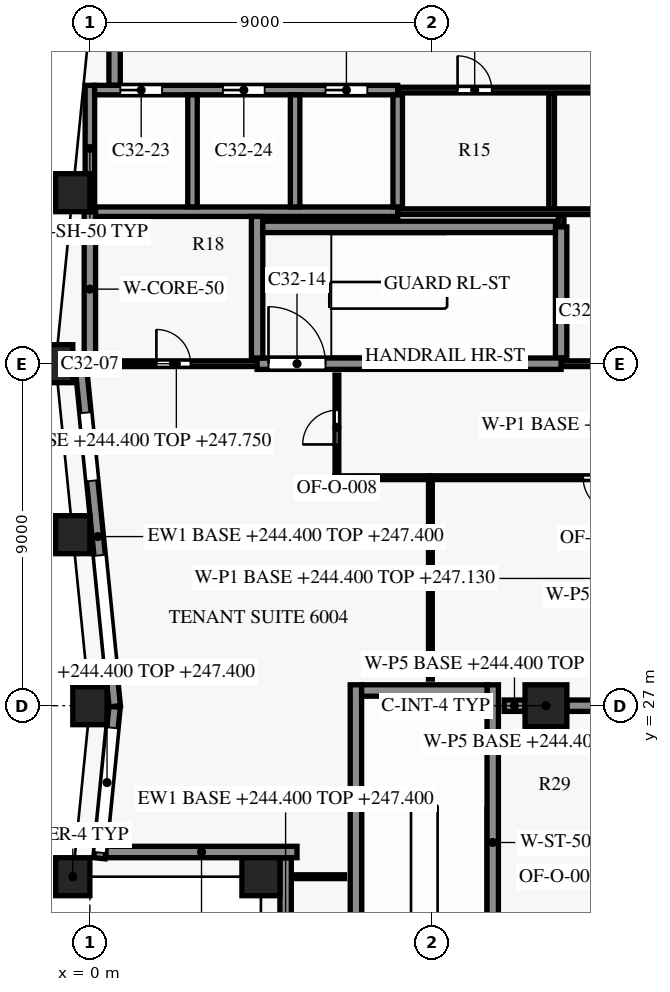
"""IFC4 building model, lengths in metres.
Left out: names, types, materials, properties, quantities, classifications, styles, units other than length and angle.
Written with IfcOpenShell. Run it as: python <this file> out.ifc"""

import sys

from ifc_helpers import new_model, si_unit, direction, frame, frame_2d, origin, origin_2d, place, context, subcontext, project, spatial, rectangle, extrude, element, fill, save


model = new_model("IFC4")
c1 = context("Model", 3, precision=1e-05, world=origin(), true_north=direction((0.0, 1.0)))
c2 = subcontext(c1, "Body", "Model", "MODEL_VIEW")
j1 = project(units=[si_unit("LENGTHUNIT", "METRE"), si_unit("PLANEANGLEUNIT", "RADIAN")], contexts=[c1])
p1 = place(None, origin())
s1 = spatial("IfcSite", under=j1, at=p1, CompositionType="ELEMENT")
p2 = place(p1, origin())
s2 = spatial("IfcBuilding", under=s1, at=p2, CompositionType="ELEMENT")
p3 = place(p2, frame((0.0, 0.0, 244.4)))
s3 = spatial("IfcBuildingStorey", under=s2, at=p3, CompositionType="ELEMENT", Elevation=244.4)
for number, where, z_axis, x_axis in (
    (1, (-0.45, 40.5, 0.0), (0.0, 0.0, 1.0), (-0.1, -0.995, 0.0)),
    (2, (-0.9, 36.0, 0.0), (0.0, 0.0, 1.0), (0.0, -1.0, 0.0)),
    (3, (-0.45, 31.5, 0.0), (0.0, 0.0, 1.0), (0.1, -0.995, 0.0)),
    (4, (0.0, 27.0, 0.0), (0.0, 0.0, 1.0), (0.0, -1.0, 0.0)),
    (5, (-0.45, 22.5, 0.0), (0.0, 0.0, 1.0), (-0.1, -0.995, 0.0)),
):
    element("IfcColumn", number, at=place(p3, frame(where, z_axis=z_axis, x_axis=x_axis)), inside=s3, PredefinedType="COLUMN", context=c2, shape_type="SweptSolid", body=[
        extrude(rectangle(XDim=0.9, YDim=1.0, at=origin_2d()), origin(), (0.0, 0.0, 1.0), 3.8),
    ])
p4 = place(p3, frame((4.5, 22.5, 0.0), z_axis=(0.0, 0.0, 1.0), x_axis=(1.0, 0.0, 0.0)))
e6 = element("IfcColumn", 6, at=p4, inside=s3, PredefinedType="COLUMN", context=c2, shape_type="SweptSolid", body=[
    extrude(rectangle(XDim=1.0, YDim=1.0, at=origin_2d()), origin(), (0.0, 0.0, 1.0), 3.8),
])
p5 = place(p3, frame((12.0, 27.0, 0.0), z_axis=(0.0, 0.0, 1.0), x_axis=(1.0, 0.0, 0.0)))
e7 = element("IfcColumn", 7, at=p5, inside=s3, PredefinedType="COLUMN", context=c2, shape_type="SweptSolid", body=[
    extrude(rectangle(XDim=1.1, YDim=1.1, at=origin_2d()), origin(), (0.0, 0.0, 1.0), 3.8),
])
p6 = place(p3, frame((0.655, 26.985, 0.0), z_axis=(0.0, 0.0, 1.0), x_axis=(-0.099509105781, 0.995036651519, 0.0)))
e8 = element("IfcWall", 8, at=p6, inside=s3, PredefinedType="SOLIDWALL", context=c2, shape_type="SweptSolid", body=[
    extrude(rectangle(XDim=8.975, YDim=0.3, at=frame_2d((4.487, 0.0))), origin(), (0.0, 0.0, 1.0), 3.0),
])
p7 = place(p6, frame((0.691, 0.0, 0.15)))
e9 = element("IfcOpeningElement", 9, at=p7, cuts=e8, PredefinedType="OPENING", context=c2, shape_type="SweptSolid", body=[
    extrude(rectangle(XDim=3.3, YDim=2.4, at=frame_2d((1.65, 1.2))), frame((0.0, 0.16, 0.0), z_axis=(0.0, -1.0, 0.0), x_axis=(1.0, 0.0, 0.0)), (0.0, 0.0, 1.0), 0.32),
])
p8 = place(p6, frame((5.964, 0.0, 0.75)))
e10 = element("IfcOpeningElement", 10, at=p8, cuts=e8, PredefinedType="OPENING", context=c2, shape_type="SweptSolid", body=[
    extrude(rectangle(XDim=1.8, YDim=1.8, at=frame_2d((0.9, 0.9))), frame((0.0, 0.16, 0.0), z_axis=(0.0, -1.0, 0.0), x_axis=(1.0, 0.0, 0.0)), (0.0, 0.0, 1.0), 0.32),
])
p9 = place(p3, frame((0.252, 22.985, 0.0), z_axis=(0.0, 0.0, 1.0), x_axis=(0.09954596771, 0.995032964435, 0.0)))
e11 = element("IfcWall", 11, at=p9, inside=s3, PredefinedType="SOLIDWALL", context=c2, shape_type="SweptSolid", body=[
    extrude(rectangle(XDim=4.005, YDim=0.3, at=frame_2d((2.002, 0.0))), origin(), (0.0, 0.0, 1.0), 3.0),
])
p10 = place(p9, frame((0.15, 0.0, 0.15)))
e12 = element("IfcOpeningElement", 12, at=p10, cuts=e11, PredefinedType="OPENING", context=c2, shape_type="SweptSolid", body=[
    extrude(rectangle(XDim=3.3, YDim=2.4, at=frame_2d((1.65, 1.2))), frame((0.0, 0.16, 0.0), z_axis=(0.0, -1.0, 0.0), x_axis=(1.0, 0.0, 0.0)), (0.0, 0.0, 1.0), 0.32),
])
p11 = place(p3, frame((5.45, 23.15, 0.0), z_axis=(0.0, 0.0, 1.0), x_axis=(-1.0, 0.0, 0.0)))
e13 = element("IfcWall", 13, at=p11, inside=s3, PredefinedType="SOLIDWALL", context=c2, shape_type="SweptSolid", body=[
    extrude(rectangle(XDim=5.026, YDim=0.3, at=frame_2d((2.513, 0.0))), origin(), (0.0, 0.0, 1.0), 3.0),
])
p12 = place(p3, frame((5.15, 18.5, 0.0), z_axis=(0.0, 0.0, 1.0), x_axis=(0.0, 1.0, 0.0)))
e14 = element("IfcWall", 14, at=p12, inside=s3, PredefinedType="SOLIDWALL", context=c2, shape_type="SweptSolid", body=[
    extrude(rectangle(XDim=4.5, YDim=0.3, at=frame_2d((2.25, 0.0))), origin(), (0.0, 0.0, 1.0), 3.0),
])
p13 = place(p3, frame((7.15, 27.4, 0.0), z_axis=(0.0, 0.0, 1.0), x_axis=(1.0, 0.0, 0.0)))
e15 = element("IfcWall", 15, at=p13, inside=s3, PredefinedType="SHEAR", context=c2, shape_type="SweptSolid", body=[
    extrude(rectangle(XDim=3.3, YDim=0.3, at=frame_2d((1.65, 0.0))), origin(), (0.0, 0.0, 1.0), 3.5),
])
p14 = place(p3, frame((0.15, 36.0, 0.0), z_axis=(0.0, 0.0, 1.0), x_axis=(1.0, 0.0, 0.0)))
e16 = element("IfcWall", 16, at=p14, inside=s3, PredefinedType="PARTITIONING", context=c2, shape_type="SweptSolid", body=[
    extrude(rectangle(XDim=4.25, YDim=0.15, at=frame_2d((2.125, 0.0))), origin(), (0.0, 0.0, 1.0), 3.35),
])
p15 = place(p14, frame((1.6, 0.0, 0.0)))
e17 = element("IfcOpeningElement", 17, at=p15, cuts=e16, PredefinedType="OPENING", context=c2, shape_type="SweptSolid", body=[
    extrude(rectangle(XDim=0.9, YDim=2.1, at=frame_2d((0.45, 1.05))), frame((0.0, 0.085, 0.0), z_axis=(0.0, -1.0, 0.0), x_axis=(1.0, 0.0, 0.0)), (0.0, 0.0, 1.0), 0.17),
])
p16 = place(p3, frame((12.4, 36.0, 0.0), z_axis=(0.0, 0.0, 1.0), x_axis=(1.0, 0.0, 0.0)))
e18 = element("IfcWall", 18, at=p16, inside=s3, PredefinedType="SHEAR", context=c2, shape_type="SweptSolid", body=[
    extrude(rectangle(XDim=11.825, YDim=0.15, at=frame_2d((5.913, 0.0))), origin(), (0.0, 0.0, 1.0), 3.5),
])
p17 = place(p16, frame((1.05, 0.0, 0.0)))
e19 = element("IfcOpeningElement", 19, at=p17, cuts=e18, PredefinedType="OPENING", context=c2, shape_type="SweptSolid", body=[
    extrude(rectangle(XDim=0.9, YDim=2.1, at=frame_2d((0.45, 1.05))), frame((0.0, 0.085, 0.0), z_axis=(0.0, -1.0, 0.0), x_axis=(1.0, 0.0, 0.0)), (0.0, 0.0, 1.0), 0.17),
])
p18 = place(p16, frame((4.15, 0.0, 0.0)))
e20 = element("IfcOpeningElement", 20, at=p18, cuts=e18, PredefinedType="OPENING", context=c2, shape_type="SweptSolid", body=[
    extrude(rectangle(XDim=1.0, YDim=2.1, at=frame_2d((0.5, 1.05))), frame((0.0, 0.085, 0.0), z_axis=(0.0, -1.0, 0.0), x_axis=(1.0, 0.0, 0.0)), (0.0, 0.0, 1.0), 0.17),
])
p19 = place(p16, frame((7.35, 0.0, 0.0)))
e21 = element("IfcOpeningElement", 21, at=p19, cuts=e18, PredefinedType="OPENING", context=c2, shape_type="SweptSolid", body=[
    extrude(rectangle(XDim=0.9, YDim=2.1, at=frame_2d((0.45, 1.05))), frame((0.0, 0.085, 0.0), z_axis=(0.0, -1.0, 0.0), x_axis=(1.0, 0.0, 0.0)), (0.0, 0.0, 1.0), 0.17),
])
p20 = place(p16, frame((10.125, 0.0, 0.0)))
e22 = element("IfcOpeningElement", 22, at=p20, cuts=e18, PredefinedType="OPENING", context=c2, shape_type="SweptSolid", body=[
    extrude(rectangle(XDim=0.95, YDim=2.1, at=frame_2d((0.475, 1.05))), frame((0.0, 0.085, 0.0), z_axis=(0.0, -1.0, 0.0), x_axis=(1.0, 0.0, 0.0)), (0.0, 0.0, 1.0), 0.17),
])
p21 = place(p3, frame((4.4, 36.0, 0.0), z_axis=(0.0, 0.0, 1.0), x_axis=(1.0, 0.0, 0.0)))
e23 = element("IfcWall", 23, at=p21, inside=s3, PredefinedType="SHEAR", context=c2, shape_type="SweptSolid", body=[
    extrude(rectangle(XDim=8.0, YDim=0.3, at=frame_2d((4.0, 0.0))), origin(), (0.0, 0.0, 1.0), 3.5),
])
p22 = place(p21, frame((0.3, 0.0, 0.0)))
e24 = element("IfcOpeningElement", 24, at=p22, cuts=e23, PredefinedType="OPENING", context=c2, shape_type="SweptSolid", body=[
    extrude(rectangle(XDim=1.5, YDim=2.2, at=frame_2d((0.75, 1.1))), frame((0.0, 0.16, 0.0), z_axis=(0.0, -1.0, 0.0), x_axis=(1.0, 0.0, 0.0)), (0.0, 0.0, 1.0), 0.32),
])
p23 = place(p3, frame((4.55, 39.6, 0.0), z_axis=(0.0, 0.0, 1.0), x_axis=(1.0, 0.0, 0.0)))
e25 = element("IfcWall", 25, at=p23, inside=s3, PredefinedType="SHEAR", context=c2, shape_type="SweptSolid", body=[
    extrude(rectangle(XDim=7.7, YDim=0.3, at=frame_2d((3.85, 0.0))), origin(), (0.0, 0.0, 1.0), 3.5),
])
p24 = place(p3, frame((8.1, 40.0, 0.0), z_axis=(0.0, 0.0, 1.0), x_axis=(1.0, 0.0, 0.0)))
e26 = element("IfcWall", 26, at=p24, inside=s3, PredefinedType="PARTITIONING", context=c2, shape_type="SweptSolid", body=[
    extrude(rectangle(XDim=16.125, YDim=0.15, at=frame_2d((8.062, 0.0))), origin(), (0.0, 0.0, 1.0), 3.35),
])
p25 = place(p3, frame((0.15, 40.0, 0.0), z_axis=(0.0, 0.0, 1.0), x_axis=(1.0, 0.0, 0.0)))
e27 = element("IfcWall", 27, at=p25, inside=s3, PredefinedType="SHEAR", context=c2, shape_type="SweptSolid", body=[
    extrude(rectangle(XDim=7.95, YDim=0.25, at=frame_2d((3.975, 0.0))), origin(), (0.0, 0.0, 1.0), 3.5),
])
p26 = place(p3, frame((8.1, 43.2, 0.0), z_axis=(0.0, 0.0, 1.0), x_axis=(1.0, 0.0, 0.0)))
e28 = element("IfcWall", 28, at=p26, inside=s3, PredefinedType="PARTITIONING", context=c2, shape_type="SweptSolid", body=[
    extrude(rectangle(XDim=16.125, YDim=0.15, at=frame_2d((8.062, 0.0))), origin(), (0.0, 0.0, 1.0), 3.35),
])
p27 = place(p26, frame((1.575, 0.0, 0.0)))
e29 = element("IfcOpeningElement", 29, at=p27, cuts=e28, PredefinedType="OPENING", context=c2, shape_type="SweptSolid", body=[
    extrude(rectangle(XDim=0.9, YDim=2.1, at=frame_2d((0.45, 1.05))), frame((0.0, 0.085, 0.0), z_axis=(0.0, -1.0, 0.0), x_axis=(1.0, 0.0, 0.0)), (0.0, 0.0, 1.0), 0.17),
])
p28 = place(p26, frame((9.675, 0.0, 0.0)))
e30 = element("IfcOpeningElement", 30, at=p28, cuts=e28, PredefinedType="OPENING", context=c2, shape_type="SweptSolid", body=[
    extrude(rectangle(XDim=0.9, YDim=2.1, at=frame_2d((0.45, 1.05))), frame((0.0, 0.085, 0.0), z_axis=(0.0, -1.0, 0.0), x_axis=(1.0, 0.0, 0.0)), (0.0, 0.0, 1.0), 0.17),
])
p29 = place(p3, frame((0.125, 43.2, 0.0), z_axis=(0.0, 0.0, 1.0), x_axis=(1.0, 0.0, 0.0)))
e31 = element("IfcWall", 31, at=p29, inside=s3, PredefinedType="SHEAR", context=c2, shape_type="SweptSolid", body=[
    extrude(rectangle(XDim=7.975, YDim=0.25, at=frame_2d((3.988, 0.0))), origin(), (0.0, 0.0, 1.0), 3.5),
])
p30 = place(p29, frame((0.675, 0.0, 0.0)))
e32 = element("IfcOpeningElement", 32, at=p30, cuts=e31, PredefinedType="OPENING", context=c2, shape_type="SweptSolid", body=[
    extrude(rectangle(XDim=1.1, YDim=2.1, at=frame_2d((0.55, 1.05))), frame((0.0, 0.135, 0.0), z_axis=(0.0, -1.0, 0.0), x_axis=(1.0, 0.0, 0.0)), (0.0, 0.0, 1.0), 0.27),
])
p31 = place(p29, frame((3.375, 0.0, 0.0)))
e33 = element("IfcOpeningElement", 33, at=p31, cuts=e31, PredefinedType="OPENING", context=c2, shape_type="SweptSolid", body=[
    extrude(rectangle(XDim=1.1, YDim=2.1, at=frame_2d((0.55, 1.05))), frame((0.0, 0.135, 0.0), z_axis=(0.0, -1.0, 0.0), x_axis=(1.0, 0.0, 0.0)), (0.0, 0.0, 1.0), 0.27),
])
p32 = place(p29, frame((6.075, 0.0, 0.0)))
e34 = element("IfcOpeningElement", 34, at=p32, cuts=e31, PredefinedType="OPENING", context=c2, shape_type="SweptSolid", body=[
    extrude(rectangle(XDim=1.1, YDim=2.1, at=frame_2d((0.55, 1.05))), frame((0.0, 0.135, 0.0), z_axis=(0.0, -1.0, 0.0), x_axis=(1.0, 0.0, 0.0)), (0.0, 0.0, 1.0), 0.27),
])
p33 = place(p3, frame((0.0, 35.925, 0.0), z_axis=(0.0, 0.0, 1.0), x_axis=(0.0, 1.0, 0.0)))
e35 = element("IfcWall", 35, at=p33, inside=s3, PredefinedType="SHEAR", context=c2, shape_type="SweptSolid", body=[
    extrude(rectangle(XDim=4.075, YDim=0.3, at=frame_2d((2.038, 0.0))), origin(), (0.0, 0.0, 1.0), 3.5),
])
p34 = place(p3, frame((0.0, 40.0, 0.0), z_axis=(0.0, 0.0, 1.0), x_axis=(0.0, 1.0, 0.0)))
e36 = element("IfcWall", 36, at=p34, inside=s3, PredefinedType="SHEAR", context=c2, shape_type="SweptSolid", body=[
    extrude(rectangle(XDim=3.325, YDim=0.25, at=frame_2d((1.663, 0.0))), origin(), (0.0, 0.0, 1.0), 3.5),
])
p35 = place(p3, frame((0.65, 43.325, 0.0), z_axis=(0.0, 0.0, 1.0), x_axis=(0.0, 1.0, 0.0)))
e37 = element("IfcWall", 37, at=p35, inside=s3, PredefinedType="SHEAR", context=c2, shape_type="SweptSolid", body=[
    extrude(rectangle(XDim=3.55, YDim=0.3, at=frame_2d((1.775, 0.0))), origin(), (0.0, 0.0, 1.0), 3.5),
])
p36 = place(p3, frame((2.7, 40.125, 0.0), z_axis=(0.0, 0.0, 1.0), x_axis=(0.0, 1.0, 0.0)))
e38 = element("IfcWall", 38, at=p36, inside=s3, PredefinedType="SHEAR", context=c2, shape_type="SweptSolid", body=[
    extrude(rectangle(XDim=2.95, YDim=0.25, at=frame_2d((1.475, 0.0))), origin(), (0.0, 0.0, 1.0), 3.5),
])
p37 = place(p3, frame((4.4, 36.15, 0.0), z_axis=(0.0, 0.0, 1.0), x_axis=(0.0, 1.0, 0.0)))
e39 = element("IfcWall", 39, at=p37, inside=s3, PredefinedType="SHEAR", context=c2, shape_type="SweptSolid", body=[
    extrude(rectangle(XDim=3.725, YDim=0.3, at=frame_2d((1.863, 0.0))), origin(), (0.0, 0.0, 1.0), 3.5),
])
p38 = place(p3, frame((5.4, 40.125, 0.0), z_axis=(0.0, 0.0, 1.0), x_axis=(0.0, 1.0, 0.0)))
e40 = element("IfcWall", 40, at=p38, inside=s3, PredefinedType="SHEAR", context=c2, shape_type="SweptSolid", body=[
    extrude(rectangle(XDim=2.95, YDim=0.25, at=frame_2d((1.475, 0.0))), origin(), (0.0, 0.0, 1.0), 3.5),
])
p39 = place(p3, frame((7.0, 19.25, 0.0), z_axis=(0.0, 0.0, 1.0), x_axis=(0.0, 1.0, 0.0)))
e41 = element("IfcWall", 41, at=p39, inside=s3, PredefinedType="SHEAR", context=c2, shape_type="SweptSolid", body=[
    extrude(rectangle(XDim=8.3, YDim=0.3, at=frame_2d((4.15, 0.0))), origin(), (0.0, 0.0, 1.0), 3.5),
])
p40 = place(p3, frame((8.1, 40.125, 0.0), z_axis=(0.0, 0.0, 1.0), x_axis=(0.0, 1.0, 0.0)))
e42 = element("IfcWall", 42, at=p40, inside=s3, PredefinedType="SHEAR", context=c2, shape_type="SweptSolid", body=[
    extrude(rectangle(XDim=2.95, YDim=0.25, at=frame_2d((1.475, 0.0))), origin(), (0.0, 0.0, 1.0), 3.5),
])
p41 = place(p3, frame((10.6, 19.25, 0.0), z_axis=(0.0, 0.0, 1.0), x_axis=(0.0, 1.0, 0.0)))
e43 = element("IfcWall", 43, at=p41, inside=s3, PredefinedType="SHEAR", context=c2, shape_type="SweptSolid", body=[
    extrude(rectangle(XDim=8.3, YDim=0.3, at=frame_2d((4.15, 0.0))), origin(), (0.0, 0.0, 1.0), 3.5),
])
p42 = place(p41, frame((0.55, 0.0, 0.0)))
e44 = element("IfcOpeningElement", 44, at=p42, cuts=e43, PredefinedType="OPENING", context=c2, shape_type="SweptSolid", body=[
    extrude(rectangle(XDim=1.2, YDim=2.2, at=frame_2d((0.6, 1.1))), frame((0.0, 0.16, 0.0), z_axis=(0.0, -1.0, 0.0), x_axis=(1.0, 0.0, 0.0)), (0.0, 0.0, 1.0), 0.32),
])
p43 = place(p3, frame((12.15, 40.075, 0.0), z_axis=(0.0, 0.0, 1.0), x_axis=(0.0, 1.0, 0.0)))
e45 = element("IfcWall", 45, at=p43, inside=s3, PredefinedType="PARTITIONING", context=c2, shape_type="SweptSolid", body=[
    extrude(rectangle(XDim=3.05, YDim=0.15, at=frame_2d((1.525, 0.0))), origin(), (0.0, 0.0, 1.0), 3.35),
])
p44 = place(p3, frame((12.4, 39.6, 0.0), z_axis=(0.0, 0.0, 1.0), x_axis=(0.0, 1.0, 0.0)))
e46 = element("IfcWall", 46, at=p44, inside=s3, PredefinedType="PARTITIONING", context=c2, shape_type="SweptSolid", body=[
    extrude(rectangle(XDim=0.325, YDim=0.15, at=frame_2d((0.163, 0.0))), origin(), (0.0, 0.0, 1.0), 3.35),
])
p45 = place(p3, frame((12.4, 36.15, 0.0), z_axis=(0.0, 0.0, 1.0), x_axis=(0.0, 1.0, 0.0)))
e47 = element("IfcWall", 47, at=p45, inside=s3, PredefinedType="SHEAR", context=c2, shape_type="SweptSolid", body=[
    extrude(rectangle(XDim=3.45, YDim=0.3, at=frame_2d((1.725, 0.0))), origin(), (0.0, 0.0, 1.0), 3.5),
])
p46 = place(p3, frame((5.35, 22.5, 0.0), z_axis=(0.0, 0.0, 1.0), x_axis=(1.0, 0.0, 0.0)))
e48 = element("IfcWall", 48, at=p46, inside=s3, PredefinedType="PARTITIONING", context=c2, shape_type="SweptSolid", body=[
    extrude(rectangle(XDim=1.35, YDim=0.1, at=frame_2d((0.675, 0.0))), origin(), (0.0, 0.0, 1.0), 3.33),
])
p47 = place(p3, frame((10.9, 27.0, 0.0), z_axis=(0.0, 0.0, 1.0), x_axis=(1.0, 0.0, 0.0)))
e49 = element("IfcWall", 49, at=p47, inside=s3, PredefinedType="PARTITIONING", context=c2, shape_type="SweptSolid", body=[
    extrude(rectangle(XDim=0.545, YDim=0.3, at=frame_2d((0.272, 0.0))), origin(), (0.0, 0.0, 1.0), 3.33),
])
p48 = place(p3, frame((12.555, 27.0, 0.0), z_axis=(0.0, 0.0, 1.0), x_axis=(1.0, 0.0, 0.0)))
e50 = element("IfcWall", 50, at=p48, inside=s3, PredefinedType="PARTITIONING", context=c2, shape_type="SweptSolid", body=[
    extrude(rectangle(XDim=1.445, YDim=0.3, at=frame_2d((0.723, 0.0))), origin(), (0.0, 0.0, 1.0), 2.73),
])
p49 = place(p3, frame((8.96, 32.95, 0.0), z_axis=(0.0, 0.0, 1.0), x_axis=(0.0, -1.0, 0.0)))
e51 = element("IfcWall", 51, at=p49, inside=s3, PredefinedType="PARTITIONING", context=c2, shape_type="SweptSolid", body=[
    extrude(rectangle(XDim=5.25, YDim=0.1, at=frame_2d((2.625, 0.0))), origin(), (0.0, 0.0, 1.0), 3.33),
])
p50 = place(p3, frame((8.96, 33.0, 0.0), z_axis=(0.0, 0.0, 1.0), x_axis=(-1.0, 0.0, 0.0)))
e52 = element("IfcWall", 52, at=p50, inside=s3, PredefinedType="PARTITIONING", context=c2, shape_type="SweptSolid", body=[
    extrude(rectangle(XDim=2.51, YDim=0.1, at=frame_2d((1.255, 0.0))), origin(), (0.0, 0.0, 1.0), 3.33),
])
p51 = place(p3, frame((17.95, 33.0, 0.0), z_axis=(0.0, 0.0, 1.0), x_axis=(-1.0, 0.0, 0.0)))
e53 = element("IfcWall", 53, at=p51, inside=s3, PredefinedType="PARTITIONING", context=c2, shape_type="SweptSolid", body=[
    extrude(rectangle(XDim=8.99, YDim=0.1, at=frame_2d((4.495, 0.0))), origin(), (0.0, 0.0, 1.0), 2.73),
])
p52 = place(p51, frame((4.07, 0.0, 0.0)))
e54 = element("IfcOpeningElement", 54, at=p52, cuts=e53, PredefinedType="OPENING", context=c2, shape_type="SweptSolid", body=[
    extrude(rectangle(XDim=0.9, YDim=2.1, at=frame_2d((0.45, 1.05))), frame((0.0, 0.06, 0.0), z_axis=(0.0, -1.0, 0.0), x_axis=(1.0, 0.0, 0.0)), (0.0, 0.0, 1.0), 0.12),
])
p53 = place(p3, frame((6.5, 33.05, 0.0), z_axis=(0.0, 0.0, 1.0), x_axis=(0.0, 1.0, 0.0)))
e55 = element("IfcWall", 55, at=p53, inside=s3, PredefinedType="PARTITIONING", context=c2, shape_type="SweptSolid", body=[
    extrude(rectangle(XDim=2.65, YDim=0.1, at=frame_2d((1.325, 0.0))), origin(), (0.0, 0.0, 1.0), 3.33),
])
p54 = place(p53, frame((0.825, 0.0, 0.0)))
e56 = element("IfcOpeningElement", 56, at=p54, cuts=e55, PredefinedType="OPENING", context=c2, shape_type="SweptSolid", body=[
    extrude(rectangle(XDim=0.9, YDim=2.1, at=frame_2d((0.45, 1.05))), frame((0.0, 0.06, 0.0), z_axis=(0.0, -1.0, 0.0), x_axis=(1.0, 0.0, 0.0)), (0.0, 0.0, 1.0), 0.12),
])
p55 = place(p7, origin())
e57 = element("IfcWindow", 57, at=p55, inside=s3, PartitioningType="SINGLE_PANEL", PredefinedType="WINDOW", context=c2, shape_type="SweptSolid", body=[
    extrude(rectangle(XDim=3.3, YDim=2.4, at=frame_2d((1.65, 1.2))), frame((0.0, 0.03, 0.0), z_axis=(0.0, -1.0, 0.0), x_axis=(1.0, 0.0, 0.0)), (0.0, 0.0, 1.0), 0.06),
])
fill(e9, e57)
p56 = place(p8, origin())
e58 = element("IfcWindow", 58, at=p56, inside=s3, PartitioningType="SINGLE_PANEL", PredefinedType="WINDOW", context=c2, shape_type="SweptSolid", body=[
    extrude(rectangle(XDim=1.8, YDim=1.8, at=frame_2d((0.9, 0.9))), frame((0.0, 0.03, 0.0), z_axis=(0.0, -1.0, 0.0), x_axis=(1.0, 0.0, 0.0)), (0.0, 0.0, 1.0), 0.06),
])
fill(e10, e58)
p57 = place(p10, origin())
e59 = element("IfcWindow", 59, at=p57, inside=s3, PartitioningType="SINGLE_PANEL", PredefinedType="WINDOW", context=c2, shape_type="SweptSolid", body=[
    extrude(rectangle(XDim=3.3, YDim=2.4, at=frame_2d((1.65, 1.2))), frame((0.0, 0.03, 0.0), z_axis=(0.0, -1.0, 0.0), x_axis=(1.0, 0.0, 0.0)), (0.0, 0.0, 1.0), 0.06),
])
fill(e12, e59)
p58 = place(p15, origin())
e60 = element("IfcDoor", 60, at=p58, inside=s3, OperationType="SINGLE_SWING_LEFT", PredefinedType="DOOR", context=c2, shape_type="SweptSolid", body=[
    extrude(rectangle(XDim=0.9, YDim=2.1, at=frame_2d((0.45, 1.05))), frame((0.0, 0.025, 0.0), z_axis=(0.0, -1.0, 0.0), x_axis=(1.0, 0.0, 0.0)), (0.0, 0.0, 1.0), 0.05),
])
fill(e17, e60)
p59 = place(p27, origin())
e61 = element("IfcDoor", 61, at=p59, inside=s3, OperationType="SINGLE_SWING_RIGHT", PredefinedType="DOOR", context=c2, shape_type="SweptSolid", body=[
    extrude(rectangle(XDim=0.9, YDim=2.1, at=frame_2d((0.45, 1.05))), frame((0.0, 0.025, 0.0), z_axis=(0.0, -1.0, 0.0), x_axis=(1.0, 0.0, 0.0)), (0.0, 0.0, 1.0), 0.05),
])
fill(e29, e61)
p60 = place(p22, origin())
e62 = element("IfcDoor", 62, at=p60, inside=s3, OperationType="SINGLE_SWING_RIGHT", PredefinedType="DOOR", context=c2, shape_type="SweptSolid", body=[
    extrude(rectangle(XDim=1.5, YDim=2.2, at=frame_2d((0.75, 1.1))), frame((0.0, 0.025, 0.0), z_axis=(0.0, -1.0, 0.0), x_axis=(1.0, 0.0, 0.0)), (0.0, 0.0, 1.0), 0.05),
])
fill(e24, e62)
p61 = place(p30, origin())
e63 = element("IfcDoor", 63, at=p61, inside=s3, OperationType="DOUBLE_DOOR_SLIDING", PredefinedType="DOOR", context=c2, shape_type="SweptSolid", body=[
    extrude(rectangle(XDim=1.1, YDim=2.1, at=frame_2d((0.55, 1.05))), frame((0.0, 0.025, 0.0), z_axis=(0.0, -1.0, 0.0), x_axis=(1.0, 0.0, 0.0)), (0.0, 0.0, 1.0), 0.05),
])
fill(e32, e63)
p62 = place(p31, origin())
e64 = element("IfcDoor", 64, at=p62, inside=s3, OperationType="DOUBLE_DOOR_SLIDING", PredefinedType="DOOR", context=c2, shape_type="SweptSolid", body=[
    extrude(rectangle(XDim=1.1, YDim=2.1, at=frame_2d((0.55, 1.05))), frame((0.0, 0.025, 0.0), z_axis=(0.0, -1.0, 0.0), x_axis=(1.0, 0.0, 0.0)), (0.0, 0.0, 1.0), 0.05),
])
fill(e33, e64)
p63 = place(p32, origin())
e65 = element("IfcDoor", 65, at=p63, inside=s3, OperationType="DOUBLE_DOOR_SLIDING", PredefinedType="DOOR", context=c2, shape_type="SweptSolid", body=[
    extrude(rectangle(XDim=1.1, YDim=2.1, at=frame_2d((0.55, 1.05))), frame((0.0, 0.025, 0.0), z_axis=(0.0, -1.0, 0.0), x_axis=(1.0, 0.0, 0.0)), (0.0, 0.0, 1.0), 0.05),
])
fill(e34, e65)
p64 = place(p54, origin())
e66 = element("IfcDoor", 66, at=p64, inside=s3, OperationType="SINGLE_SWING_LEFT", PredefinedType="DOOR", context=c2, shape_type="SweptSolid", body=[
    extrude(rectangle(XDim=0.9, YDim=2.1, at=frame_2d((0.45, 1.05))), frame((0.0, 0.025, 0.0), z_axis=(0.0, -1.0, 0.0), x_axis=(1.0, 0.0, 0.0)), (0.0, 0.0, 1.0), 0.05),
])
fill(e56, e66)
p65 = place(p52, origin())
e67 = element("IfcDoor", 67, at=p65, inside=s3, OperationType="SINGLE_SWING_RIGHT", PredefinedType="DOOR", context=c2, shape_type="SweptSolid", body=[
    extrude(rectangle(XDim=0.9, YDim=2.1, at=frame_2d((0.45, 1.05))), frame((0.0, 0.025, 0.0), z_axis=(0.0, -1.0, 0.0), x_axis=(1.0, 0.0, 0.0)), (0.0, 0.0, 1.0), 0.05),
])
fill(e54, e67)
save(model, sys.argv[1])
